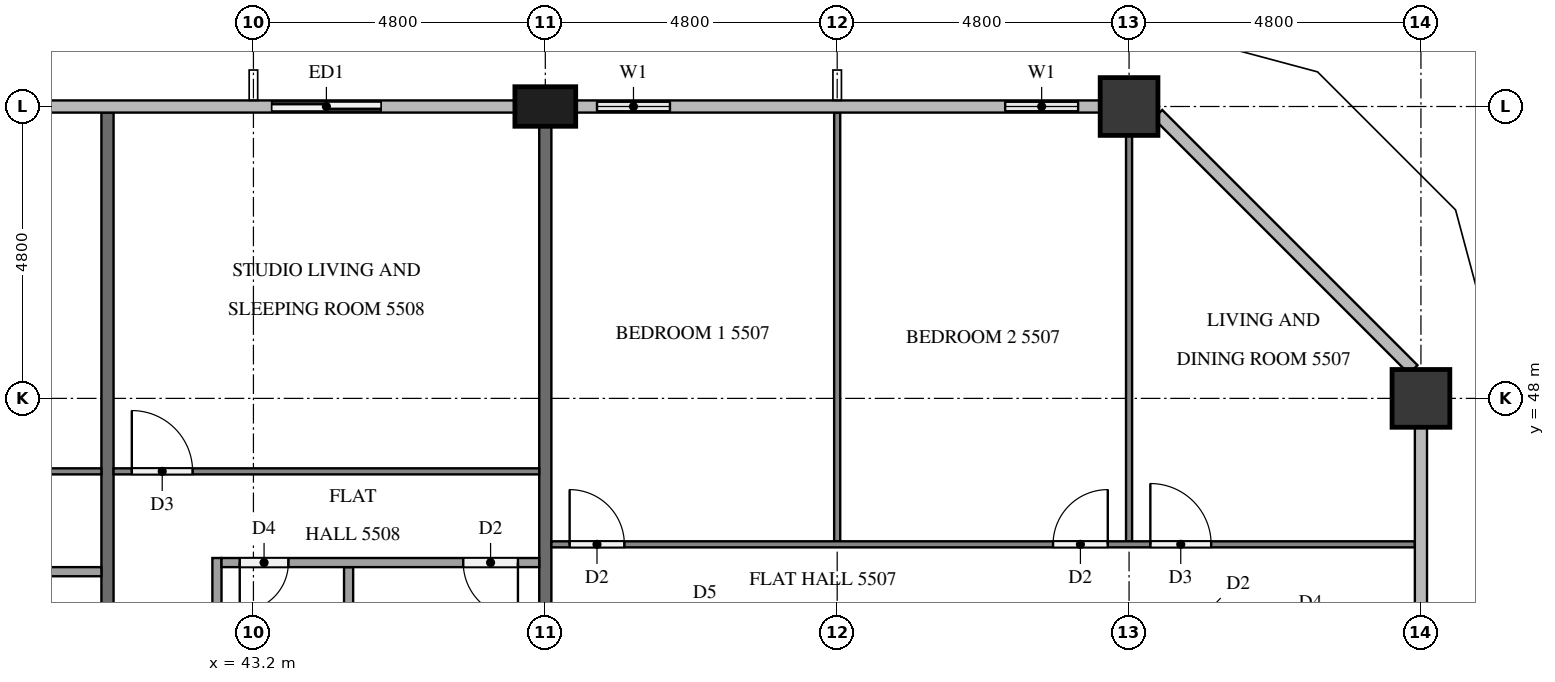
"""IFC4 building model, lengths in metres.
Left out: names, types, materials, properties, quantities, classifications, styles, units other than length and angle.
Written with IfcOpenShell. Run it as: python <this file> out.ifc"""

import sys

from ifc_helpers import new_model, si_unit, direction, frame, frame_2d, origin, origin_2d, place, context, subcontext, project, spatial, rectangle, extrude, element, fill, save


model = new_model("IFC4")
c1 = context("Model", 3, precision=1e-05, world=origin(), true_north=direction((0.0, 1.0)))
c2 = subcontext(c1, "Body", "Model", "MODEL_VIEW")
j1 = project(units=[si_unit("LENGTHUNIT", "METRE"), si_unit("PLANEANGLEUNIT", "RADIAN")], contexts=[c1])
p1 = place(None, origin())
s1 = spatial("IfcSite", under=j1, at=p1, CompositionType="ELEMENT")
p2 = place(p1, origin())
s2 = spatial("IfcBuilding", under=s1, at=p2, CompositionType="ELEMENT")
p3 = place(p2, frame((0.0, 0.0, 212.3)))
s3 = spatial("IfcBuildingStorey", under=s2, at=p3, CompositionType="ELEMENT", Elevation=212.3)
for number, where, z_axis, x_axis in (
    (1, (62.4, 48.0, 0.0), (0.0, 0.0, 1.0), (1.0, 0.0, 0.0)),
    (2, (57.6, 52.8, 0.0), (0.0, 0.0, 1.0), (1.0, 0.0, 0.0)),
):
    element("IfcColumn", number, at=place(p3, frame(where, z_axis=z_axis, x_axis=x_axis)), inside=s3, PredefinedType="COLUMN", context=c2, shape_type="SweptSolid", body=[
        extrude(rectangle(XDim=0.95, YDim=0.95, at=origin_2d()), origin(), (0.0, 0.0, 1.0), 3.2),
    ])
p4 = place(p3, frame((48.0, 52.8, 0.0), z_axis=(0.0, 0.0, 1.0), x_axis=(1.0, 0.0, 0.0)))
e3 = element("IfcColumn", 3, at=p4, inside=s3, PredefinedType="COLUMN", context=c2, shape_type="SweptSolid", body=[
    extrude(rectangle(XDim=1.0, YDim=0.65, at=origin_2d()), origin(), (0.0, 0.0, 1.0), 3.2),
])
p5 = place(p3, frame((57.125, 52.8, 0.0), z_axis=(0.0, 0.0, 1.0), x_axis=(-1.0, 0.0, 0.0)))
e4 = element("IfcWall", 4, at=p5, inside=s3, PredefinedType="SOLIDWALL", context=c2, shape_type="SweptSolid", body=[
    extrude(rectangle(XDim=1.925, YDim=0.15, at=frame_2d((0.962, 0.0))), origin(), (0.0, 0.0, 1.0), 3.2),
])
p6 = place(p5, frame((0.363, 0.0, 0.9)))
e5 = element("IfcOpeningElement", 5, at=p6, cuts=e4, PredefinedType="OPENING", context=c2, shape_type="SweptSolid", body=[
    extrude(rectangle(XDim=1.2, YDim=1.4, at=frame_2d((0.6, 0.7))), frame((0.0, 0.085, 0.0), z_axis=(0.0, -1.0, 0.0), x_axis=(1.0, 0.0, 0.0)), (0.0, 0.0, 1.0), 0.17),
])
p7 = place(p3, frame((50.4, 52.8, 0.0), z_axis=(0.0, 0.0, 1.0), x_axis=(-1.0, 0.0, 0.0)))
e6 = element("IfcWall", 6, at=p7, inside=s3, PredefinedType="SOLIDWALL", context=c2, shape_type="SweptSolid", body=[
    extrude(rectangle(XDim=1.9, YDim=0.15, at=frame_2d((0.95, 0.0))), origin(), (0.0, 0.0, 1.0), 3.2),
])
p8 = place(p7, frame((0.35, 0.0, 0.9)))
e7 = element("IfcOpeningElement", 7, at=p8, cuts=e6, PredefinedType="OPENING", context=c2, shape_type="SweptSolid", body=[
    extrude(rectangle(XDim=1.2, YDim=1.4, at=frame_2d((0.6, 0.7))), frame((0.0, 0.085, 0.0), z_axis=(0.0, -1.0, 0.0), x_axis=(1.0, 0.0, 0.0)), (0.0, 0.0, 1.0), 0.17),
])
p9 = place(p3, frame((45.6, 52.8, 0.0), z_axis=(0.0, 0.0, 1.0), x_axis=(-1.0, 0.0, 0.0)))
e8 = element("IfcWall", 8, at=p9, inside=s3, PredefinedType="SOLIDWALL", context=c2, shape_type="SweptSolid", body=[
    extrude(rectangle(XDim=2.4, YDim=0.15, at=frame_2d((1.2, 0.0))), origin(), (0.0, 0.0, 1.0), 3.2),
])
p10 = place(p9, frame((0.3, 0.0, 0.0)))
e9 = element("IfcOpeningElement", 9, at=p10, cuts=e8, PredefinedType="OPENING", context=c2, shape_type="SweptSolid", body=[
    extrude(rectangle(XDim=1.8, YDim=2.4, at=frame_2d((0.9, 1.2))), frame((0.0, 0.085, 0.0), z_axis=(0.0, -1.0, 0.0), x_axis=(1.0, 0.0, 0.0)), (0.0, 0.0, 1.0), 0.17),
])
p11 = place(p3, frame((48.0, 52.475, 0.0), z_axis=(0.0, 0.0, 1.0), x_axis=(0.0, -1.0, 0.0)))
e10 = element("IfcWall", 10, at=p11, inside=s3, PredefinedType="PARTITIONING", context=c2, shape_type="SweptSolid", body=[
    extrude(rectangle(XDim=11.575, YDim=0.2, at=frame_2d((5.788, 0.0))), origin(), (0.0, 0.0, 1.0), 3.2),
])
p12 = place(p3, frame((40.8, 52.7, 0.0), z_axis=(0.0, 0.0, 1.0), x_axis=(0.0, -1.0, 0.0)))
e11 = element("IfcWall", 11, at=p12, inside=s3, PredefinedType="PARTITIONING", context=c2, shape_type="SweptSolid", body=[
    extrude(rectangle(XDim=11.8, YDim=0.2, at=frame_2d((5.9, 0.0))), origin(), (0.0, 0.0, 1.0), 3.2),
])
p13 = place(p3, frame((52.8, 45.65, 0.0), z_axis=(0.0, 0.0, 1.0), x_axis=(0.0, 1.0, 0.0)))
e12 = element("IfcWall", 12, at=p13, inside=s3, PredefinedType="PARTITIONING", context=c2, shape_type="SweptSolid", body=[
    extrude(rectangle(XDim=7.05, YDim=0.1, at=frame_2d((3.525, 0.0))), origin(), (0.0, 0.0, 1.0), 3.2),
])
p14 = place(p3, frame((57.6, 45.65, 0.0), z_axis=(0.0, 0.0, 1.0), x_axis=(0.0, 1.0, 0.0)))
e13 = element("IfcWall", 13, at=p14, inside=s3, PredefinedType="PARTITIONING", context=c2, shape_type="SweptSolid", body=[
    extrude(rectangle(XDim=6.675, YDim=0.1, at=frame_2d((3.337, 0.0))), origin(), (0.0, 0.0, 1.0), 3.2),
])
p15 = place(p3, frame((48.1, 45.6, 0.0), z_axis=(0.0, 0.0, 1.0), x_axis=(1.0, 0.0, 0.0)))
e14 = element("IfcWall", 14, at=p15, inside=s3, PredefinedType="PARTITIONING", context=c2, shape_type="SweptSolid", body=[
    extrude(rectangle(XDim=14.2, YDim=0.1, at=frame_2d((7.1, 0.0))), origin(), (0.0, 0.0, 1.0), 3.2),
])
p16 = place(p15, frame((0.3, 0.0, 0.0)))
e15 = element("IfcOpeningElement", 15, at=p16, cuts=e14, PredefinedType="OPENING", context=c2, shape_type="SweptSolid", body=[
    extrude(rectangle(XDim=0.9, YDim=2.1, at=frame_2d((0.45, 1.05))), frame((0.0, 0.06, 0.0), z_axis=(0.0, -1.0, 0.0), x_axis=(1.0, 0.0, 0.0)), (0.0, 0.0, 1.0), 0.12),
])
p17 = place(p15, frame((8.25, 0.0, 0.0)))
e16 = element("IfcOpeningElement", 16, at=p17, cuts=e14, PredefinedType="OPENING", context=c2, shape_type="SweptSolid", body=[
    extrude(rectangle(XDim=0.9, YDim=2.1, at=frame_2d((0.45, 1.05))), frame((0.0, 0.06, 0.0), z_axis=(0.0, -1.0, 0.0), x_axis=(1.0, 0.0, 0.0)), (0.0, 0.0, 1.0), 0.12),
])
p18 = place(p15, frame((9.85, 0.0, 0.0)))
e17 = element("IfcOpeningElement", 17, at=p18, cuts=e14, PredefinedType="OPENING", context=c2, shape_type="SweptSolid", body=[
    extrude(rectangle(XDim=1.0, YDim=2.1, at=frame_2d((0.5, 1.05))), frame((0.0, 0.06, 0.0), z_axis=(0.0, -1.0, 0.0), x_axis=(1.0, 0.0, 0.0)), (0.0, 0.0, 1.0), 0.12),
])
p19 = place(p3, frame((40.9, 46.8, 0.0), z_axis=(0.0, 0.0, 1.0), x_axis=(1.0, 0.0, 0.0)))
e18 = element("IfcWall", 18, at=p19, inside=s3, PredefinedType="PARTITIONING", context=c2, shape_type="SweptSolid", body=[
    extrude(rectangle(XDim=7.0, YDim=0.1, at=frame_2d((3.5, 0.0))), origin(), (0.0, 0.0, 1.0), 3.2),
])
p20 = place(p19, frame((0.3, 0.0, 0.0)))
e19 = element("IfcOpeningElement", 19, at=p20, cuts=e18, PredefinedType="OPENING", context=c2, shape_type="SweptSolid", body=[
    extrude(rectangle(XDim=1.0, YDim=2.1, at=frame_2d((0.5, 1.05))), frame((0.0, 0.06, 0.0), z_axis=(0.0, -1.0, 0.0), x_axis=(1.0, 0.0, 0.0)), (0.0, 0.0, 1.0), 0.12),
])
p21 = place(p3, frame((44.765, 40.9, 0.0), z_axis=(0.0, 0.0, 1.0), x_axis=(0.0, 1.0, 0.0)))
e20 = element("IfcWall", 20, at=p21, inside=s3, PredefinedType="PARTITIONING", context=c2, shape_type="SweptSolid", body=[
    extrude(rectangle(XDim=4.325, YDim=0.15, at=frame_2d((2.163, 0.0))), origin(), (0.0, 0.0, 1.0), 3.2),
])
p22 = place(p3, frame((42.6, 40.9, 0.0), z_axis=(0.0, 0.0, 1.0), x_axis=(0.0, 1.0, 0.0)))
e21 = element("IfcWall", 21, at=p22, inside=s3, PredefinedType="PARTITIONING", context=c2, shape_type="SweptSolid", body=[
    extrude(rectangle(XDim=4.475, YDim=0.15, at=frame_2d((2.238, 0.0))), origin(), (0.0, 0.0, 1.0), 3.2),
])
p23 = place(p3, frame((47.9, 45.3, 0.0), z_axis=(0.0, 0.0, 1.0), x_axis=(-1.0, 0.0, 0.0)))
e22 = element("IfcWall", 22, at=p23, inside=s3, PredefinedType="PARTITIONING", context=c2, shape_type="SweptSolid", body=[
    extrude(rectangle(XDim=5.225, YDim=0.15, at=frame_2d((2.612, 0.0))), origin(), (0.0, 0.0, 1.0), 3.2),
])
p24 = place(p23, frame((4.125, 0.0, 0.0)))
e23 = element("IfcOpeningElement", 23, at=p24, cuts=e22, PredefinedType="OPENING", context=c2, shape_type="SweptSolid", body=[
    extrude(rectangle(XDim=0.8, YDim=2.1, at=frame_2d((0.4, 1.05))), frame((0.0, 0.085, 0.0), z_axis=(0.0, -1.0, 0.0), x_axis=(1.0, 0.0, 0.0)), (0.0, 0.0, 1.0), 0.17),
])
p25 = place(p23, frame((0.35, 0.0, 0.0)))
e24 = element("IfcOpeningElement", 24, at=p25, cuts=e22, PredefinedType="OPENING", context=c2, shape_type="SweptSolid", body=[
    extrude(rectangle(XDim=0.9, YDim=2.1, at=frame_2d((0.45, 1.05))), frame((0.0, 0.085, 0.0), z_axis=(0.0, -1.0, 0.0), x_axis=(1.0, 0.0, 0.0)), (0.0, 0.0, 1.0), 0.17),
])
p26 = place(p3, frame((24.1, 46.8, 0.0), z_axis=(0.0, 0.0, 1.0), x_axis=(1.0, 0.0, 0.0)))
e25 = element("IfcWall", 25, at=p26, inside=s3, PredefinedType="PARTITIONING", context=c2, shape_type="SweptSolid", body=[
    extrude(rectangle(XDim=16.6, YDim=0.1, at=frame_2d((8.3, 0.0))), origin(), (0.0, 0.0, 1.0), 3.2),
])
p27 = place(p26, frame((0.3, 0.0, 0.0)))
e26 = element("IfcOpeningElement", 26, at=p27, cuts=e25, PredefinedType="OPENING", context=c2, shape_type="SweptSolid", body=[
    extrude(rectangle(XDim=0.9, YDim=2.1, at=frame_2d((0.45, 1.05))), frame((0.0, 0.06, 0.0), z_axis=(0.0, -1.0, 0.0), x_axis=(1.0, 0.0, 0.0)), (0.0, 0.0, 1.0), 0.12),
])
p28 = place(p26, frame((10.55, 0.0, 0.0)))
e27 = element("IfcOpeningElement", 27, at=p28, cuts=e25, PredefinedType="OPENING", context=c2, shape_type="SweptSolid", body=[
    extrude(rectangle(XDim=1.0, YDim=2.1, at=frame_2d((0.5, 1.05))), frame((0.0, 0.06, 0.0), z_axis=(0.0, -1.0, 0.0), x_axis=(1.0, 0.0, 0.0)), (0.0, 0.0, 1.0), 0.12),
])
p29 = place(p26, frame((12.25, 0.0, 0.0)))
e28 = element("IfcOpeningElement", 28, at=p29, cuts=e25, PredefinedType="OPENING", context=c2, shape_type="SweptSolid", body=[
    extrude(rectangle(XDim=0.9, YDim=2.1, at=frame_2d((0.45, 1.05))), frame((0.0, 0.06, 0.0), z_axis=(0.0, -1.0, 0.0), x_axis=(1.0, 0.0, 0.0)), (0.0, 0.0, 1.0), 0.12),
])
p30 = place(p3, frame((40.7, 45.15, 0.0), z_axis=(0.0, 0.0, 1.0), x_axis=(-1.0, 0.0, 0.0)))
e29 = element("IfcWall", 29, at=p30, inside=s3, PredefinedType="PARTITIONING", context=c2, shape_type="SweptSolid", body=[
    extrude(rectangle(XDim=14.825, YDim=0.15, at=frame_2d((7.413, 0.0))), origin(), (0.0, 0.0, 1.0), 3.2),
])
p31 = place(p30, frame((13.625, 0.0, 0.0)))
e30 = element("IfcOpeningElement", 30, at=p31, cuts=e29, PredefinedType="OPENING", context=c2, shape_type="SweptSolid", body=[
    extrude(rectangle(XDim=0.9, YDim=2.1, at=frame_2d((0.45, 1.05))), frame((0.0, 0.085, 0.0), z_axis=(0.0, -1.0, 0.0), x_axis=(1.0, 0.0, 0.0)), (0.0, 0.0, 1.0), 0.17),
])
p32 = place(p30, frame((3.746, 0.0, 0.0)))
e31 = element("IfcOpeningElement", 31, at=p32, cuts=e29, PredefinedType="OPENING", context=c2, shape_type="SweptSolid", body=[
    extrude(rectangle(XDim=0.9, YDim=2.1, at=frame_2d((0.45, 1.05))), frame((0.0, 0.085, 0.0), z_axis=(0.0, -1.0, 0.0), x_axis=(1.0, 0.0, 0.0)), (0.0, 0.0, 1.0), 0.17),
])
p33 = place(p30, frame((2.296, 0.0, 0.0)))
e32 = element("IfcOpeningElement", 32, at=p33, cuts=e29, PredefinedType="OPENING", context=c2, shape_type="SweptSolid", body=[
    extrude(rectangle(XDim=0.8, YDim=2.1, at=frame_2d((0.4, 1.05))), frame((0.0, 0.085, 0.0), z_axis=(0.0, -1.0, 0.0), x_axis=(1.0, 0.0, 0.0)), (0.0, 0.0, 1.0), 0.17),
])
p34 = place(p6, origin())
e33 = element("IfcWindow", 33, at=p34, inside=s3, PartitioningType="SINGLE_PANEL", PredefinedType="WINDOW", context=c2, shape_type="SweptSolid", body=[
    extrude(rectangle(XDim=1.2, YDim=1.4, at=frame_2d((0.6, 0.7))), frame((0.0, 0.03, 0.0), z_axis=(0.0, -1.0, 0.0), x_axis=(1.0, 0.0, 0.0)), (0.0, 0.0, 1.0), 0.06),
])
fill(e5, e33)
p35 = place(p8, origin())
e34 = element("IfcWindow", 34, at=p35, inside=s3, PartitioningType="SINGLE_PANEL", PredefinedType="WINDOW", context=c2, shape_type="SweptSolid", body=[
    extrude(rectangle(XDim=1.2, YDim=1.4, at=frame_2d((0.6, 0.7))), frame((0.0, 0.03, 0.0), z_axis=(0.0, -1.0, 0.0), x_axis=(1.0, 0.0, 0.0)), (0.0, 0.0, 1.0), 0.06),
])
fill(e7, e34)
p36 = place(p10, origin())
e35 = element("IfcDoor", 35, at=p36, inside=s3, OperationType="SLIDING_TO_LEFT", PredefinedType="DOOR", context=c2, shape_type="SweptSolid", body=[
    extrude(rectangle(XDim=1.8, YDim=2.4, at=frame_2d((0.9, 1.2))), frame((0.0, 0.025, 0.0), z_axis=(0.0, -1.0, 0.0), x_axis=(1.0, 0.0, 0.0)), (0.0, 0.0, 1.0), 0.05),
])
fill(e9, e35)
p37 = place(p16, origin())
e36 = element("IfcDoor", 36, at=p37, inside=s3, OperationType="SINGLE_SWING_LEFT", PredefinedType="DOOR", context=c2, shape_type="SweptSolid", body=[
    extrude(rectangle(XDim=0.9, YDim=2.1, at=frame_2d((0.45, 1.05))), frame((0.0, 0.025, 0.0), z_axis=(0.0, -1.0, 0.0), x_axis=(1.0, 0.0, 0.0)), (0.0, 0.0, 1.0), 0.05),
])
fill(e15, e36)
p38 = place(p17, origin())
e37 = element("IfcDoor", 37, at=p38, inside=s3, OperationType="SINGLE_SWING_RIGHT", PredefinedType="DOOR", context=c2, shape_type="SweptSolid", body=[
    extrude(rectangle(XDim=0.9, YDim=2.1, at=frame_2d((0.45, 1.05))), frame((0.0, 0.025, 0.0), z_axis=(0.0, -1.0, 0.0), x_axis=(1.0, 0.0, 0.0)), (0.0, 0.0, 1.0), 0.05),
])
fill(e16, e37)
p39 = place(p18, origin())
e38 = element("IfcDoor", 38, at=p39, inside=s3, OperationType="SINGLE_SWING_LEFT", PredefinedType="DOOR", context=c2, shape_type="SweptSolid", body=[
    extrude(rectangle(XDim=1.0, YDim=2.1, at=frame_2d((0.5, 1.05))), frame((0.0, 0.025, 0.0), z_axis=(0.0, -1.0, 0.0), x_axis=(1.0, 0.0, 0.0)), (0.0, 0.0, 1.0), 0.05),
])
fill(e17, e38)
p40 = place(p20, origin())
e39 = element("IfcDoor", 39, at=p40, inside=s3, OperationType="SINGLE_SWING_LEFT", PredefinedType="DOOR", context=c2, shape_type="SweptSolid", body=[
    extrude(rectangle(XDim=1.0, YDim=2.1, at=frame_2d((0.5, 1.05))), frame((0.0, 0.025, 0.0), z_axis=(0.0, -1.0, 0.0), x_axis=(1.0, 0.0, 0.0)), (0.0, 0.0, 1.0), 0.05),
])
fill(e19, e39)
p41 = place(p24, origin())
e40 = element("IfcDoor", 40, at=p41, inside=s3, OperationType="SINGLE_SWING_RIGHT", PredefinedType="DOOR", context=c2, shape_type="SweptSolid", body=[
    extrude(rectangle(XDim=0.8, YDim=2.1, at=frame_2d((0.4, 1.05))), frame((0.0, 0.025, 0.0), z_axis=(0.0, -1.0, 0.0), x_axis=(1.0, 0.0, 0.0)), (0.0, 0.0, 1.0), 0.05),
])
fill(e23, e40)
p42 = place(p25, origin())
e41 = element("IfcDoor", 41, at=p42, inside=s3, OperationType="SINGLE_SWING_LEFT", PredefinedType="DOOR", context=c2, shape_type="SweptSolid", body=[
    extrude(rectangle(XDim=0.9, YDim=2.1, at=frame_2d((0.45, 1.05))), frame((0.0, 0.025, 0.0), z_axis=(0.0, -1.0, 0.0), x_axis=(1.0, 0.0, 0.0)), (0.0, 0.0, 1.0), 0.05),
])
fill(e24, e41)
save(model, sys.argv[1])
